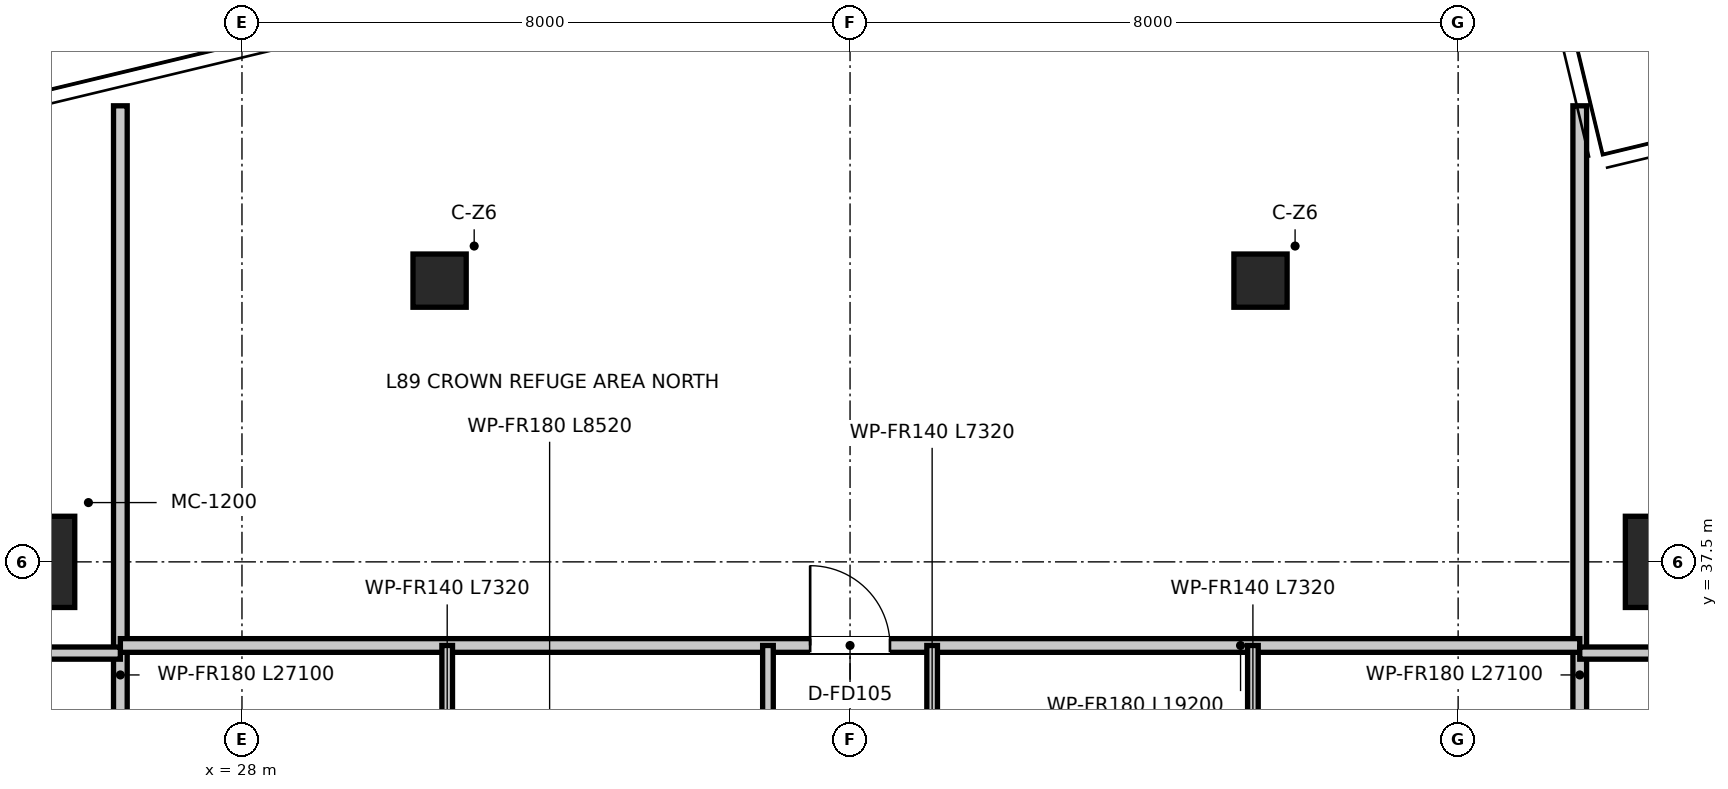
"""IFC4 building model, lengths in metres.
Left out: names, types, materials, properties, quantities, classifications, styles, units other than length and angle.
Written with IfcOpenShell. Run it as: python <this file> out.ifc"""

import sys

from ifc_helpers import new_model, si_unit, direction, frame, frame_2d, origin, origin_2d, place, context, subcontext, project, spatial, rectangle, extrude, source, transform, mapped, element, fill, save


model = new_model("IFC4")
c1 = context("Model", 3, precision=1e-05, world=origin(), true_north=direction((0.0, 1.0)))
c2 = subcontext(c1, "Body", "Model", "MODEL_VIEW")
j1 = project(units=[si_unit("LENGTHUNIT", "METRE"), si_unit("PLANEANGLEUNIT", "RADIAN")], contexts=[c1])
p1 = place(None, origin())
s1 = spatial("IfcSite", under=j1, at=p1, CompositionType="ELEMENT")
p2 = place(p1, origin())
s2 = spatial("IfcBuilding", under=s1, at=p2, CompositionType="ELEMENT")
p3 = place(p2, frame((0.0, 0.0, 363.25)))
s3 = spatial("IfcBuildingStorey", under=s2, at=p3, CompositionType="ELEMENT", Elevation=363.25)
m1 = source(origin(), c2, "Body", "SweptSolid", [
    extrude(rectangle(XDim=1.2, YDim=1.2, at=origin_2d()), origin(), (0.0, 0.0, 1.0), 3.8),
])
for number, where, z_axis, x_axis in (
    (1, (46.8, 37.5, 0.0), (0.0, 0.0, 1.0), (1.0, 0.0, 0.0)),
    (2, (25.2, 37.5, 0.0), (0.0, 0.0, 1.0), (1.0, 0.0, 0.0)),
):
    element("IfcColumn", number, at=place(p3, frame(where, z_axis=z_axis, x_axis=x_axis)), inside=s3, PredefinedType="USERDEFINED", context=c2, shape_type="MappedRepresentation", body=[
        mapped(m1, transform((0.0, 0.0, 0.0), x_axis=(1.0, 0.0, 0.0), y_axis=(0.0, 1.0, 0.0), z_axis=(0.0, 0.0, 1.0), scale=1.0)),
    ])
m2 = source(origin(), c2, "Body", "SweptSolid", [
    extrude(rectangle(XDim=0.7, YDim=0.7, at=origin_2d()), origin(), (0.0, 0.0, 1.0), 3.8),
])
for number, where, z_axis, x_axis in (
    (3, (30.6, 41.2, 0.0), (0.0, 0.0, 1.0), (1.0, 0.0, 0.0)),
    (4, (41.4, 41.2, 0.0), (0.0, 0.0, 1.0), (1.0, 0.0, 0.0)),
):
    element("IfcColumn", number, at=place(p3, frame(where, z_axis=z_axis, x_axis=x_axis)), inside=s3, PredefinedType="COLUMN", context=c2, shape_type="MappedRepresentation", body=[
        mapped(m2, transform((0.0, 0.0, 0.0), x_axis=(1.0, 0.0, 0.0), y_axis=(0.0, 1.0, 0.0), z_axis=(0.0, 0.0, 1.0), scale=1.0)),
    ])
p4 = place(p3, frame((26.4, 16.4, 0.0), z_axis=(0.0, 0.0, 1.0), x_axis=(0.0, 1.0, 0.0)))
e5 = element("IfcWall", 5, at=p4, inside=s3, PredefinedType="PARTITIONING", context=c2, shape_type="SweptSolid", body=[
    extrude(rectangle(XDim=27.1, YDim=0.18, at=frame_2d((13.55, 0.0))), origin(), (0.0, 0.0, 1.0), 2.8),
])
p5 = place(p4, frame((11.025, 0.0, 0.0)))
e6 = element("IfcOpeningElement", 6, at=p5, cuts=e5, PredefinedType="OPENING", context=c2, shape_type="SweptSolid", body=[
    extrude(rectangle(XDim=0.95, YDim=2.1, at=frame_2d((0.475, 1.05))), frame((0.0, 0.1, 0.0), z_axis=(0.0, -1.0, 0.0), x_axis=(1.0, 0.0, 0.0)), (0.0, 0.0, 1.0), 0.2),
])
p6 = place(p3, frame((45.6, 16.4, 0.0), z_axis=(0.0, 0.0, 1.0), x_axis=(0.0, 1.0, 0.0)))
e7 = element("IfcWall", 7, at=p6, inside=s3, PredefinedType="PARTITIONING", context=c2, shape_type="SweptSolid", body=[
    extrude(rectangle(XDim=27.1, YDim=0.18, at=frame_2d((13.55, 0.0))), origin(), (0.0, 0.0, 1.0), 2.8),
])
p7 = place(p6, frame((11.025, 0.0, 0.0)))
e8 = element("IfcOpeningElement", 8, at=p7, cuts=e7, PredefinedType="OPENING", context=c2, shape_type="SweptSolid", body=[
    extrude(rectangle(XDim=0.95, YDim=2.1, at=frame_2d((0.475, 1.05))), frame((0.0, 0.1, 0.0), z_axis=(0.0, -1.0, 0.0), x_axis=(1.0, 0.0, 0.0)), (0.0, 0.0, 1.0), 0.2),
])
p8 = place(p3, frame((26.4, 36.4, 0.0), z_axis=(0.0, 0.0, 1.0), x_axis=(1.0, 0.0, 0.0)))
e9 = element("IfcWall", 9, at=p8, inside=s3, PredefinedType="PARTITIONING", context=c2, shape_type="SweptSolid", body=[
    extrude(rectangle(XDim=19.2, YDim=0.18, at=frame_2d((9.6, 0.0))), origin(), (0.0, 0.0, 1.0), 2.8),
])
p9 = place(p8, frame((9.075, 0.0, 0.0)))
e10 = element("IfcOpeningElement", 10, at=p9, cuts=e9, PredefinedType="OPENING", context=c2, shape_type="SweptSolid", body=[
    extrude(rectangle(XDim=1.05, YDim=2.1, at=frame_2d((0.525, 1.05))), frame((0.0, 0.1, 0.0), z_axis=(0.0, -1.0, 0.0), x_axis=(1.0, 0.0, 0.0)), (0.0, 0.0, 1.0), 0.2),
])
p10 = place(p3, frame((34.92, 29.08, 0.0), z_axis=(0.0, 0.0, 1.0), x_axis=(0.0, 1.0, 0.0)))
e11 = element("IfcWall", 11, at=p10, inside=s3, PredefinedType="PARTITIONING", context=c2, shape_type="SweptSolid", body=[
    extrude(rectangle(XDim=7.32, YDim=0.14, at=frame_2d((3.66, 0.0))), origin(), (0.0, 0.0, 1.0), 2.8),
])
p11 = place(p10, frame((1.245, 0.0, 0.0)))
e12 = element("IfcOpeningElement", 12, at=p11, cuts=e11, PredefinedType="OPENING", context=c2, shape_type="SweptSolid", body=[
    extrude(rectangle(XDim=0.95, YDim=2.1, at=frame_2d((0.475, 1.05))), frame((0.0, 0.08, 0.0), z_axis=(0.0, -1.0, 0.0), x_axis=(1.0, 0.0, 0.0)), (0.0, 0.0, 1.0), 0.16),
])
p12 = place(p10, frame((4.845, 0.0, 0.0)))
e13 = element("IfcOpeningElement", 13, at=p12, cuts=e11, PredefinedType="OPENING", context=c2, shape_type="SweptSolid", body=[
    extrude(rectangle(XDim=0.95, YDim=2.1, at=frame_2d((0.475, 1.05))), frame((0.0, 0.08, 0.0), z_axis=(0.0, -1.0, 0.0), x_axis=(1.0, 0.0, 0.0)), (0.0, 0.0, 1.0), 0.16),
])
p13 = place(p3, frame((37.08, 29.08, 0.0), z_axis=(0.0, 0.0, 1.0), x_axis=(0.0, 1.0, 0.0)))
e14 = element("IfcWall", 14, at=p13, inside=s3, PredefinedType="PARTITIONING", context=c2, shape_type="SweptSolid", body=[
    extrude(rectangle(XDim=7.32, YDim=0.14, at=frame_2d((3.66, 0.0))), origin(), (0.0, 0.0, 1.0), 2.8),
])
p14 = place(p13, frame((1.245, 0.0, 0.0)))
e15 = element("IfcOpeningElement", 15, at=p14, cuts=e14, PredefinedType="OPENING", context=c2, shape_type="SweptSolid", body=[
    extrude(rectangle(XDim=0.95, YDim=2.1, at=frame_2d((0.475, 1.05))), frame((0.0, 0.08, 0.0), z_axis=(0.0, -1.0, 0.0), x_axis=(1.0, 0.0, 0.0)), (0.0, 0.0, 1.0), 0.16),
])
p15 = place(p13, frame((4.845, 0.0, 0.0)))
e16 = element("IfcOpeningElement", 16, at=p15, cuts=e14, PredefinedType="OPENING", context=c2, shape_type="SweptSolid", body=[
    extrude(rectangle(XDim=0.95, YDim=2.1, at=frame_2d((0.475, 1.05))), frame((0.0, 0.08, 0.0), z_axis=(0.0, -1.0, 0.0), x_axis=(1.0, 0.0, 0.0)), (0.0, 0.0, 1.0), 0.16),
])
for number, where, z_axis, x_axis in (
    (17, (30.7, 29.08, 0.0), (0.0, 0.0, 1.0), (0.0, 1.0, 0.0)),
    (18, (41.3, 29.08, 0.0), (0.0, 0.0, 1.0), (0.0, 1.0, 0.0)),
):
    element("IfcWall", number, at=place(p3, frame(where, z_axis=z_axis, x_axis=x_axis)), inside=s3, PredefinedType="PARTITIONING", context=c2, shape_type="SweptSolid", body=[
        extrude(rectangle(XDim=7.32, YDim=0.14, at=frame_2d((3.66, 0.0))), origin(), (0.0, 0.0, 1.0), 2.8),
    ])
for number, where, z_axis, x_axis in (
    (19, (17.0, 36.3, 0.0), (0.0, 0.0, 1.0), (1.0, 0.0, 0.0)),
    (20, (45.6, 36.3, 0.0), (0.0, 0.0, 1.0), (1.0, 0.0, 0.0)),
):
    element("IfcWall", number, at=place(p3, frame(where, z_axis=z_axis, x_axis=x_axis)), inside=s3, PredefinedType="PARTITIONING", context=c2, shape_type="SweptSolid", body=[
        extrude(rectangle(XDim=9.4, YDim=0.16, at=frame_2d((4.7, 0.0))), origin(), (0.0, 0.0, 1.0), 2.8),
    ])
p16 = place(p9, origin())
e21 = element("IfcDoor", 21, at=p16, inside=s3, OperationType="SINGLE_SWING_LEFT", PredefinedType="DOOR", context=c2, shape_type="SweptSolid", body=[
    extrude(rectangle(XDim=1.05, YDim=2.1, at=frame_2d((0.525, 1.05))), frame((0.0, 0.025, 0.0), z_axis=(0.0, -1.0, 0.0), x_axis=(1.0, 0.0, 0.0)), (0.0, 0.0, 1.0), 0.05),
])
fill(e10, e21)
save(model, sys.argv[1])
